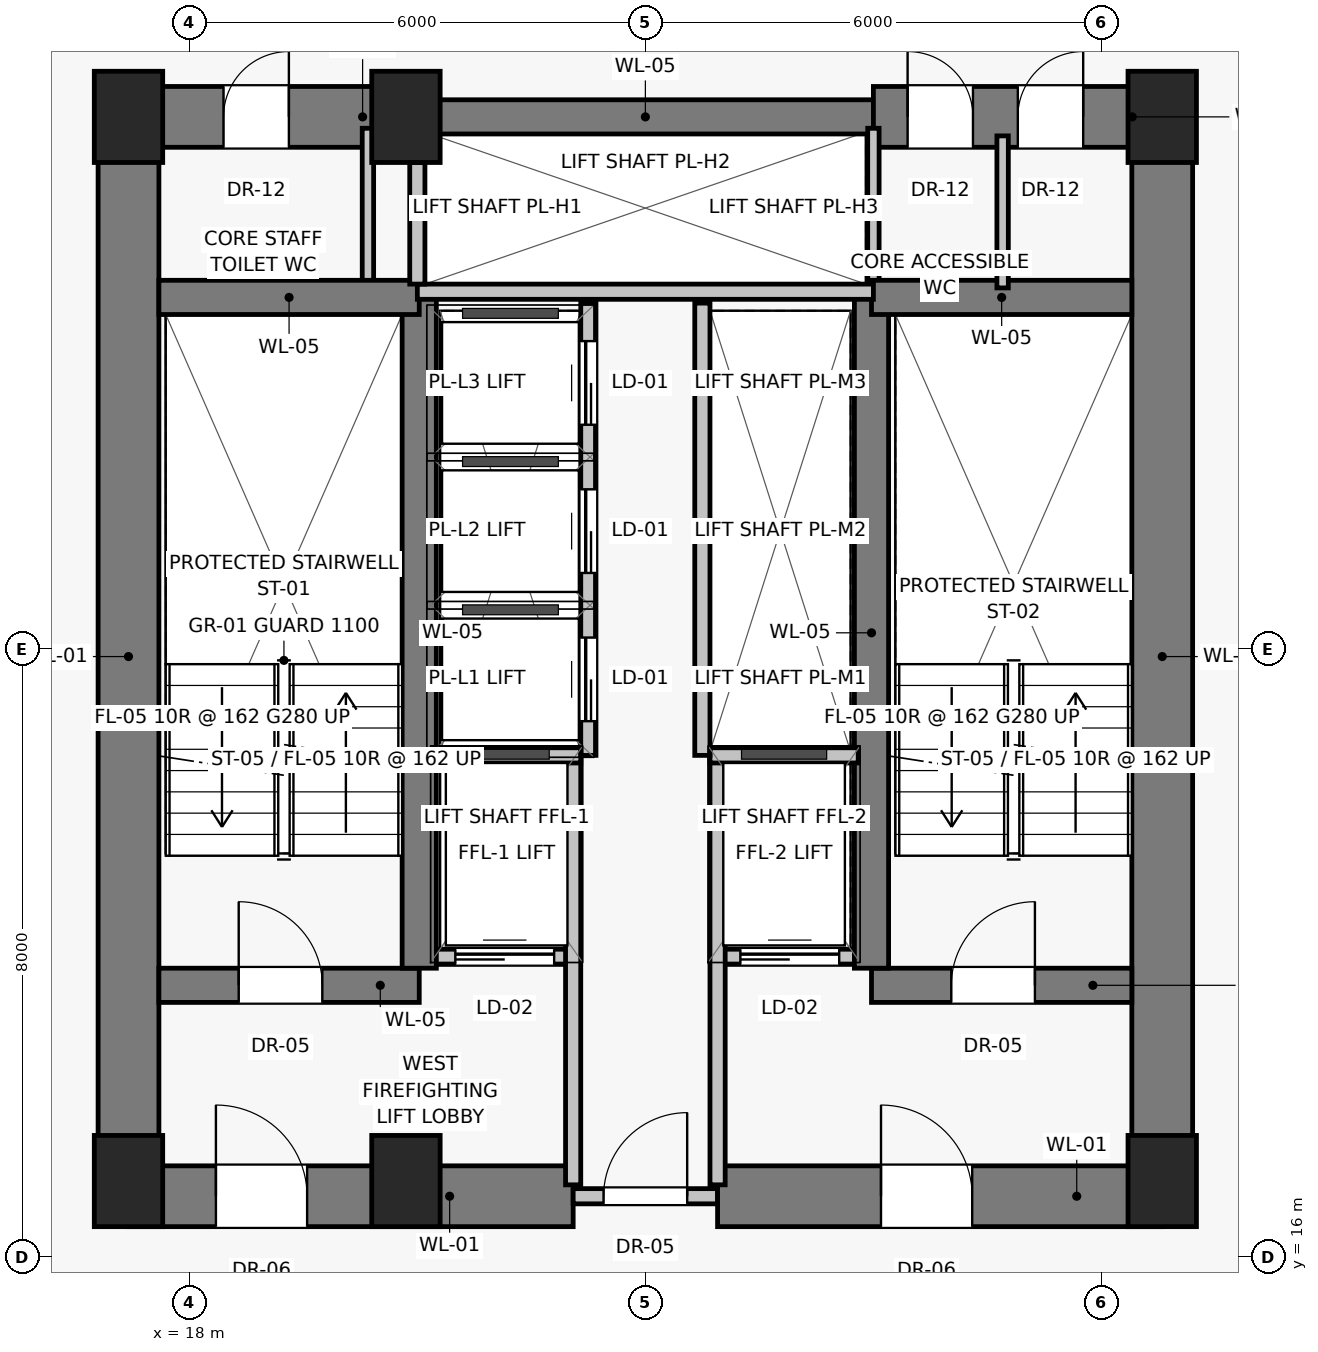
"""IFC4 building model, lengths in metres.
Left out: names, types, materials, properties, quantities, classifications, styles, units other than length and angle.
Written with IfcOpenShell. Run it as: python <this file> out.ifc"""

import sys

from ifc_helpers import new_model, si_unit, direction, frame, frame_2d, origin, origin_2d, place, context, subcontext, project, spatial, rectangle, extrude, source, transform, mapped, element, fill, save


model = new_model("IFC4")
c1 = context("Model", 3, precision=1e-05, world=origin(), true_north=direction((0.0, 1.0)))
c2 = subcontext(c1, "Body", "Model", "MODEL_VIEW")
j1 = project(units=[si_unit("LENGTHUNIT", "METRE"), si_unit("PLANEANGLEUNIT", "RADIAN")], contexts=[c1])
p1 = place(None, origin())
s1 = spatial("IfcSite", under=j1, at=p1, CompositionType="ELEMENT")
p2 = place(p1, origin())
s2 = spatial("IfcBuilding", under=s1, at=p2, CompositionType="ELEMENT")
p3 = place(p2, frame((0.0, 0.0, 37.05)))
s3 = spatial("IfcBuildingStorey", under=s2, at=p3, CompositionType="ELEMENT", Elevation=37.05)
for number, where, z_axis, x_axis in (
    (1, (17.2, 17.0, 0.0), (0.0, 0.0, 1.0), (1.0, 0.0, 0.0)),
    (2, (20.85, 17.0, 0.0), (0.0, 0.0, 1.0), (1.0, 0.0, 0.0)),
    (3, (30.8, 17.0, 0.0), (0.0, 0.0, 1.0), (1.0, 0.0, 0.0)),
    (4, (17.2, 31.0, 0.0), (0.0, 0.0, 1.0), (1.0, 0.0, 0.0)),
    (5, (20.85, 31.0, 0.0), (0.0, 0.0, 1.0), (1.0, 0.0, 0.0)),
    (6, (30.8, 31.0, 0.0), (0.0, 0.0, 1.0), (1.0, 0.0, 0.0)),
):
    element("IfcColumn", number, at=place(p3, frame(where, z_axis=z_axis, x_axis=x_axis)), inside=s3, PredefinedType="PILASTER", context=c2, shape_type="SweptSolid", body=[
        extrude(rectangle(XDim=0.9, YDim=1.2, at=origin_2d()), origin(), (0.0, 0.0, 1.0), 3.25),
    ])
for number, where, z_axis, x_axis in (
    (7, (17.2, 16.8, 0.0), (0.0, 0.0, 1.0), (0.0, 1.0, 0.0)),
    (8, (30.8, 16.8, 0.0), (0.0, 0.0, 1.0), (0.0, 1.0, 0.0)),
):
    element("IfcWall", number, at=place(p3, frame(where, z_axis=z_axis, x_axis=x_axis)), inside=s3, PredefinedType="SHEAR", context=c2, shape_type="SweptSolid", body=[
        extrude(rectangle(XDim=14.2, YDim=0.8, at=frame_2d((7.1, 0.0))), origin(), (0.0, 0.0, 1.0), 3.0),
    ])
p4 = place(p3, frame((17.2, 16.8, 0.0), z_axis=(0.0, 0.0, 1.0), x_axis=(1.0, 0.0, 0.0)))
e9 = element("IfcWall", 9, at=p4, inside=s3, PredefinedType="SHEAR", context=c2, shape_type="SweptSolid", body=[
    extrude(rectangle(XDim=5.85, YDim=0.8, at=frame_2d((2.925, 0.0))), origin(), (0.0, 0.0, 1.0), 3.0),
])
p5 = place(p4, frame((1.15, 0.0, 0.0)))
e10 = element("IfcOpeningElement", 10, at=p5, cuts=e9, PredefinedType="OPENING", context=c2, shape_type="SweptSolid", body=[
    extrude(rectangle(XDim=1.2, YDim=2.03, at=frame_2d((0.6, 1.015))), frame((0.0, 0.41, 0.0), z_axis=(0.0, -1.0, 0.0), x_axis=(1.0, 0.0, 0.0)), (0.0, 0.0, 1.0), 0.82),
])
p6 = place(p3, frame((23.05, 16.8, 0.0), z_axis=(0.0, 0.0, 1.0), x_axis=(1.0, 0.0, 0.0)))
e11 = element("IfcWall", 11, at=p6, inside=s3, PredefinedType="SOLIDWALL", context=c2, shape_type="SweptSolid", body=[
    extrude(rectangle(XDim=1.9, YDim=0.2, at=frame_2d((0.95, 0.0))), origin(), (0.0, 0.0, 1.0), 2.15),
])
p7 = place(p6, frame((0.4, 0.0, 0.0)))
e12 = element("IfcOpeningElement", 12, at=p7, cuts=e11, PredefinedType="OPENING", context=c2, shape_type="SweptSolid", body=[
    extrude(rectangle(XDim=1.1, YDim=2.03, at=frame_2d((0.55, 1.015))), frame((0.0, 0.11, 0.0), z_axis=(0.0, -1.0, 0.0), x_axis=(1.0, 0.0, 0.0)), (0.0, 0.0, 1.0), 0.22),
])
p8 = place(p3, frame((24.95, 16.8, 0.0), z_axis=(0.0, 0.0, 1.0), x_axis=(1.0, 0.0, 0.0)))
e13 = element("IfcWall", 13, at=p8, inside=s3, PredefinedType="SHEAR", context=c2, shape_type="SweptSolid", body=[
    extrude(rectangle(XDim=5.85, YDim=0.8, at=frame_2d((2.925, 0.0))), origin(), (0.0, 0.0, 1.0), 3.0),
])
p9 = place(p8, frame((2.15, 0.0, 0.0)))
e14 = element("IfcOpeningElement", 14, at=p9, cuts=e13, PredefinedType="OPENING", context=c2, shape_type="SweptSolid", body=[
    extrude(rectangle(XDim=1.2, YDim=2.03, at=frame_2d((0.6, 1.015))), frame((0.0, 0.41, 0.0), z_axis=(0.0, -1.0, 0.0), x_axis=(1.0, 0.0, 0.0)), (0.0, 0.0, 1.0), 0.82),
])
p10 = place(p3, frame((17.2, 31.0, 0.0), z_axis=(0.0, 0.0, 1.0), x_axis=(1.0, 0.0, 0.0)))
e15 = element("IfcWall", 15, at=p10, inside=s3, PredefinedType="SHEAR", context=c2, shape_type="SweptSolid", body=[
    extrude(rectangle(XDim=3.8, YDim=0.8, at=frame_2d((1.9, 0.0))), origin(), (0.0, 0.0, 1.0), 3.0),
])
p11 = place(p10, frame((1.25, 0.0, 0.0)))
e16 = element("IfcOpeningElement", 16, at=p11, cuts=e15, PredefinedType="OPENING", context=c2, shape_type="SweptSolid", body=[
    extrude(rectangle(XDim=0.86, YDim=2.01, at=frame_2d((0.43, 1.005))), frame((0.0, 0.41, 0.0), z_axis=(0.0, -1.0, 0.0), x_axis=(1.0, 0.0, 0.0)), (0.0, 0.0, 1.0), 0.82),
])
p12 = place(p3, frame((21.0, 31.0, 0.0), z_axis=(0.0, 0.0, 1.0), x_axis=(1.0, 0.0, 0.0)))
e17 = element("IfcWall", 17, at=p12, inside=s3, PredefinedType="SHEAR", context=c2, shape_type="SweptSolid", body=[
    extrude(rectangle(XDim=6.0, YDim=0.45, at=frame_2d((3.0, 0.0))), origin(), (0.0, 0.0, 1.0), 3.0),
])
p13 = place(p3, frame((27.0, 31.0, 0.0), z_axis=(0.0, 0.0, 1.0), x_axis=(1.0, 0.0, 0.0)))
e18 = element("IfcWall", 18, at=p13, inside=s3, PredefinedType="SHEAR", context=c2, shape_type="SweptSolid", body=[
    extrude(rectangle(XDim=3.8, YDim=0.8, at=frame_2d((1.9, 0.0))), origin(), (0.0, 0.0, 1.0), 3.0),
])
p14 = place(p13, frame((0.45, 0.0, 0.0)))
e19 = element("IfcOpeningElement", 19, at=p14, cuts=e18, PredefinedType="OPENING", context=c2, shape_type="SweptSolid", body=[
    extrude(rectangle(XDim=0.86, YDim=2.01, at=frame_2d((0.43, 1.005))), frame((0.0, 0.41, 0.0), z_axis=(0.0, -1.0, 0.0), x_axis=(1.0, 0.0, 0.0)), (0.0, 0.0, 1.0), 0.82),
])
p15 = place(p13, frame((1.9, 0.0, 0.0)))
e20 = element("IfcOpeningElement", 20, at=p15, cuts=e18, PredefinedType="OPENING", context=c2, shape_type="SweptSolid", body=[
    extrude(rectangle(XDim=0.86, YDim=2.01, at=frame_2d((0.43, 1.005))), frame((0.0, 0.41, 0.0), z_axis=(0.0, -1.0, 0.0), x_axis=(1.0, 0.0, 0.0)), (0.0, 0.0, 1.0), 0.82),
])
for number, where, z_axis, x_axis in (
    (21, (20.35, 28.65, 0.0), (0.0, 0.0, 1.0), (0.0, 1.0, 0.0)),
    (22, (27.0, 28.65, 0.0), (0.0, 0.0, 1.0), (0.0, 1.0, 0.0)),
):
    element("IfcWall", number, at=place(p3, frame(where, z_axis=z_axis, x_axis=x_axis)), inside=s3, PredefinedType="PARTITIONING", context=c2, shape_type="SweptSolid", body=[
        extrude(rectangle(XDim=2.2, YDim=0.15, at=frame_2d((1.1, 0.0))), origin(), (0.0, 0.0, 1.0), 3.0),
    ])
p16 = place(p3, frame((17.6, 19.575, 0.0), z_axis=(0.0, 0.0, 1.0), x_axis=(1.0, 0.0, 0.0)))
e23 = element("IfcWall", 23, at=p16, inside=s3, PredefinedType="SHEAR", context=c2, shape_type="SweptSolid", body=[
    extrude(rectangle(XDim=3.425, YDim=0.45, at=frame_2d((1.712, 0.0))), origin(), (0.0, 0.0, 1.0), 3.0),
])
p17 = place(p16, frame((1.05, 0.0, 0.0)))
e24 = element("IfcOpeningElement", 24, at=p17, cuts=e23, PredefinedType="OPENING", context=c2, shape_type="SweptSolid", body=[
    extrude(rectangle(XDim=1.1, YDim=2.03, at=frame_2d((0.55, 1.015))), frame((0.0, 0.235, 0.0), z_axis=(0.0, -1.0, 0.0), x_axis=(1.0, 0.0, 0.0)), (0.0, 0.0, 1.0), 0.47),
])
p18 = place(p3, frame((21.2, 19.95, 0.0), z_axis=(0.0, 0.0, 1.0), x_axis=(1.0, 0.0, 0.0)))
e25 = element("IfcWall", 25, at=p18, inside=s3, PredefinedType="SOLIDWALL", context=c2, shape_type="SweptSolid", body=[
    extrude(rectangle(XDim=1.85, YDim=0.2, at=frame_2d((0.925, 0.0))), origin(), (0.0, 0.0, 1.0), 3.0),
])
p19 = place(p18, frame((0.3, 0.0, 0.0)))
e26 = element("IfcOpeningElement", 26, at=p19, cuts=e25, PredefinedType="OPENING", context=c2, shape_type="SweptSolid", body=[
    extrude(rectangle(XDim=1.3, YDim=2.25, at=frame_2d((0.65, 1.125))), frame((0.0, 0.11, 0.0), z_axis=(0.0, -1.0, 0.0), x_axis=(1.0, 0.0, 0.0)), (0.0, 0.0, 1.0), 0.22),
])
p20 = place(p3, frame((24.95, 19.95, 0.0), z_axis=(0.0, 0.0, 1.0), x_axis=(1.0, 0.0, 0.0)))
e27 = element("IfcWall", 27, at=p20, inside=s3, PredefinedType="SOLIDWALL", context=c2, shape_type="SweptSolid", body=[
    extrude(rectangle(XDim=1.85, YDim=0.2, at=frame_2d((0.925, 0.0))), origin(), (0.0, 0.0, 1.0), 3.0),
])
p21 = place(p20, frame((0.3, 0.0, 0.0)))
e28 = element("IfcOpeningElement", 28, at=p21, cuts=e27, PredefinedType="OPENING", context=c2, shape_type="SweptSolid", body=[
    extrude(rectangle(XDim=1.3, YDim=2.25, at=frame_2d((0.65, 1.125))), frame((0.0, 0.11, 0.0), z_axis=(0.0, -1.0, 0.0), x_axis=(1.0, 0.0, 0.0)), (0.0, 0.0, 1.0), 0.22),
])
p22 = place(p3, frame((26.975, 19.575, 0.0), z_axis=(0.0, 0.0, 1.0), x_axis=(1.0, 0.0, 0.0)))
e29 = element("IfcWall", 29, at=p22, inside=s3, PredefinedType="SHEAR", context=c2, shape_type="SweptSolid", body=[
    extrude(rectangle(XDim=3.425, YDim=0.45, at=frame_2d((1.712, 0.0))), origin(), (0.0, 0.0, 1.0), 3.0),
])
p23 = place(p22, frame((1.05, 0.0, 0.0)))
e30 = element("IfcOpeningElement", 30, at=p23, cuts=e29, PredefinedType="OPENING", context=c2, shape_type="SweptSolid", body=[
    extrude(rectangle(XDim=1.1, YDim=2.03, at=frame_2d((0.55, 1.015))), frame((0.0, 0.235, 0.0), z_axis=(0.0, -1.0, 0.0), x_axis=(1.0, 0.0, 0.0)), (0.0, 0.0, 1.0), 0.47),
])
for number, where, z_axis, x_axis in (
    (31, (21.025, 19.8, 0.0), (0.0, 0.0, 1.0), (0.0, 1.0, 0.0)),
    (32, (26.975, 19.8, 0.0), (0.0, 0.0, 1.0), (0.0, 1.0, 0.0)),
):
    element("IfcWall", number, at=place(p3, frame(where, z_axis=z_axis, x_axis=x_axis)), inside=s3, PredefinedType="SHEAR", context=c2, shape_type="SweptSolid", body=[
        extrude(rectangle(XDim=8.825, YDim=0.45, at=frame_2d((4.413, 0.0))), origin(), (0.0, 0.0, 1.0), 3.0),
    ])
for number, where, z_axis, x_axis in (
    (33, (17.6, 28.625, 0.0), (0.0, 0.0, 1.0), (1.0, 0.0, 0.0)),
    (34, (26.975, 28.625, 0.0), (0.0, 0.0, 1.0), (1.0, 0.0, 0.0)),
):
    element("IfcWall", number, at=place(p3, frame(where, z_axis=z_axis, x_axis=x_axis)), inside=s3, PredefinedType="SHEAR", context=c2, shape_type="SweptSolid", body=[
        extrude(rectangle(XDim=3.425, YDim=0.45, at=frame_2d((1.712, 0.0))), origin(), (0.0, 0.0, 1.0), 3.0),
    ])
for number, where, z_axis, x_axis in (
    (35, (23.05, 16.95, 0.0), (0.0, 0.0, 1.0), (0.0, 1.0, 0.0)),
    (36, (24.95, 16.95, 0.0), (0.0, 0.0, 1.0), (0.0, 1.0, 0.0)),
):
    element("IfcWall", number, at=place(p3, frame(where, z_axis=z_axis, x_axis=x_axis)), inside=s3, PredefinedType="SOLIDWALL", context=c2, shape_type="SweptSolid", body=[
        extrude(rectangle(XDim=5.6, YDim=0.2, at=frame_2d((2.8, 0.0))), origin(), (0.0, 0.0, 1.0), 3.0),
    ])
for number, where, z_axis, x_axis in (
    (37, (21.2, 22.6, 0.0), (0.0, 0.0, 1.0), (1.0, 0.0, 0.0)),
    (38, (24.85, 22.6, 0.0), (0.0, 0.0, 1.0), (1.0, 0.0, 0.0)),
):
    element("IfcWall", number, at=place(p3, frame(where, z_axis=z_axis, x_axis=x_axis)), inside=s3, PredefinedType="SOLIDWALL", context=c2, shape_type="SweptSolid", body=[
        extrude(rectangle(XDim=1.95, YDim=0.2, at=frame_2d((0.975, 0.0))), origin(), (0.0, 0.0, 1.0), 3.0),
    ])
p24 = place(p3, frame((21.0, 28.7, 0.0), z_axis=(0.0, 0.0, 1.0), x_axis=(1.0, 0.0, 0.0)))
e39 = element("IfcWall", 39, at=p24, inside=s3, PredefinedType="SOLIDWALL", context=c2, shape_type="SweptSolid", body=[
    extrude(rectangle(XDim=6.0, YDim=0.2, at=frame_2d((3.0, 0.0))), origin(), (0.0, 0.0, 1.0), 3.0),
])
p25 = place(p3, frame((21.0, 28.8, 0.0), z_axis=(0.0, 0.0, 1.0), x_axis=(0.0, 1.0, 0.0)))
e40 = element("IfcWall", 40, at=p25, inside=s3, PredefinedType="SOLIDWALL", context=c2, shape_type="SweptSolid", body=[
    extrude(rectangle(XDim=1.6, YDim=0.2, at=frame_2d((0.8, 0.0))), origin(), (0.0, 0.0, 1.0), 3.0),
])
p26 = place(p3, frame((23.25, 22.6, 0.0), z_axis=(0.0, 0.0, 1.0), x_axis=(0.0, 1.0, 0.0)))
e41 = element("IfcWall", 41, at=p26, inside=s3, PredefinedType="SOLIDWALL", context=c2, shape_type="SweptSolid", body=[
    extrude(rectangle(XDim=5.95, YDim=0.2, at=frame_2d((2.975, 0.0))), origin(), (0.0, 0.0, 1.0), 3.0),
])
p27 = place(p26, frame((0.45, 0.0, 0.0)))
e42 = element("IfcOpeningElement", 42, at=p27, cuts=e41, PredefinedType="OPENING", context=c2, shape_type="SweptSolid", body=[
    extrude(rectangle(XDim=1.1, YDim=2.08, at=frame_2d((0.55, 1.04))), frame((0.0, 0.11, 0.0), z_axis=(0.0, -1.0, 0.0), x_axis=(1.0, 0.0, 0.0)), (0.0, 0.0, 1.0), 0.22),
])
p28 = place(p26, frame((2.4, 0.0, 0.0)))
e43 = element("IfcOpeningElement", 43, at=p28, cuts=e41, PredefinedType="OPENING", context=c2, shape_type="SweptSolid", body=[
    extrude(rectangle(XDim=1.1, YDim=2.08, at=frame_2d((0.55, 1.04))), frame((0.0, 0.11, 0.0), z_axis=(0.0, -1.0, 0.0), x_axis=(1.0, 0.0, 0.0)), (0.0, 0.0, 1.0), 0.22),
])
p29 = place(p26, frame((4.35, 0.0, 0.0)))
e44 = element("IfcOpeningElement", 44, at=p29, cuts=e41, PredefinedType="OPENING", context=c2, shape_type="SweptSolid", body=[
    extrude(rectangle(XDim=1.1, YDim=2.08, at=frame_2d((0.55, 1.04))), frame((0.0, 0.11, 0.0), z_axis=(0.0, -1.0, 0.0), x_axis=(1.0, 0.0, 0.0)), (0.0, 0.0, 1.0), 0.22),
])
p30 = place(p3, frame((24.75, 22.6, 0.0), z_axis=(0.0, 0.0, 1.0), x_axis=(0.0, 1.0, 0.0)))
e45 = element("IfcWall", 45, at=p30, inside=s3, PredefinedType="SOLIDWALL", context=c2, shape_type="SweptSolid", body=[
    extrude(rectangle(XDim=5.95, YDim=0.2, at=frame_2d((2.975, 0.0))), origin(), (0.0, 0.0, 1.0), 3.0),
])
p31 = place(p3, frame((28.7, 28.75, 0.0), z_axis=(0.0, 0.0, 1.0), x_axis=(0.0, 1.0, 0.0)))
e46 = element("IfcWall", 46, at=p31, inside=s3, PredefinedType="PARTITIONING", context=c2, shape_type="SweptSolid", body=[
    extrude(rectangle(XDim=2.0, YDim=0.15, at=frame_2d((1.0, 0.0))), origin(), (0.0, 0.0, 1.0), 3.0),
])
m1 = source(origin(), c2, "Body", "SweptSolid", [
    extrude(rectangle(XDim=1.2, YDim=2.03, at=frame_2d((0.6, 1.015))), frame((0.0, 0.025, 0.0), z_axis=(0.0, -1.0, 0.0), x_axis=(1.0, 0.0, 0.0)), (0.0, 0.0, 1.0), 0.05),
])
p32 = place(p5, origin())
e47 = element("IfcDoor", 47, at=p32, inside=s3, OperationType="SINGLE_SWING_LEFT", PredefinedType="DOOR", context=c2, shape_type="MappedRepresentation", body=[
    mapped(m1, transform((0.0, 0.0, 0.0), scale=1.0)),
])
fill(e10, e47)
m2 = source(origin(), c2, "Body", "SweptSolid", [
    extrude(rectangle(XDim=1.1, YDim=2.03, at=frame_2d((0.55, 1.015))), frame((0.0, 0.025, 0.0), z_axis=(0.0, -1.0, 0.0), x_axis=(1.0, 0.0, 0.0)), (0.0, 0.0, 1.0), 0.05),
])
p33 = place(p7, origin())
e48 = element("IfcDoor", 48, at=p33, inside=s3, OperationType="SINGLE_SWING_RIGHT", PredefinedType="DOOR", context=c2, shape_type="MappedRepresentation", body=[
    mapped(m2, transform((0.0, 0.0, 0.0), scale=1.0)),
])
fill(e12, e48)
p34 = place(p9, origin())
e49 = element("IfcDoor", 49, at=p34, inside=s3, OperationType="SINGLE_SWING_LEFT", PredefinedType="DOOR", context=c2, shape_type="MappedRepresentation", body=[
    mapped(m1, transform((0.0, 0.0, 0.0), scale=1.0)),
])
fill(e14, e49)
m3 = source(origin(), c2, "Body", "SweptSolid", [
    extrude(rectangle(XDim=0.86, YDim=2.01, at=frame_2d((0.43, 1.005))), frame((0.0, 0.025, 0.0), z_axis=(0.0, -1.0, 0.0), x_axis=(1.0, 0.0, 0.0)), (0.0, 0.0, 1.0), 0.05),
])
p35 = place(p11, origin())
e50 = element("IfcDoor", 50, at=p35, inside=s3, OperationType="SINGLE_SWING_RIGHT", PredefinedType="DOOR", context=c2, shape_type="MappedRepresentation", body=[
    mapped(m3, transform((0.0, 0.0, 0.0), scale=1.0)),
])
fill(e16, e50)
p36 = place(p14, origin())
e51 = element("IfcDoor", 51, at=p36, inside=s3, OperationType="SINGLE_SWING_LEFT", PredefinedType="DOOR", context=c2, shape_type="MappedRepresentation", body=[
    mapped(m3, transform((0.0, 0.0, 0.0), scale=1.0)),
])
fill(e19, e51)
p37 = place(p15, origin())
e52 = element("IfcDoor", 52, at=p37, inside=s3, OperationType="SINGLE_SWING_RIGHT", PredefinedType="DOOR", context=c2, shape_type="MappedRepresentation", body=[
    mapped(m3, transform((0.0, 0.0, 0.0), scale=1.0)),
])
fill(e20, e52)
p38 = place(p17, origin())
e53 = element("IfcDoor", 53, at=p38, inside=s3, OperationType="SINGLE_SWING_LEFT", PredefinedType="DOOR", context=c2, shape_type="MappedRepresentation", body=[
    mapped(m2, transform((0.0, 0.0, 0.0), scale=1.0)),
])
fill(e24, e53)
m4 = source(origin(), c2, "Body", "SweptSolid", [
    extrude(rectangle(XDim=1.3, YDim=2.25, at=frame_2d((0.65, 1.125))), frame((0.0, 0.025, 0.0), z_axis=(0.0, -1.0, 0.0), x_axis=(1.0, 0.0, 0.0)), (0.0, 0.0, 1.0), 0.05),
])
p39 = place(p19, origin())
e54 = element("IfcDoor", 54, at=p39, inside=s3, OperationType="SLIDING_TO_LEFT", PredefinedType="DOOR", context=c2, shape_type="MappedRepresentation", body=[
    mapped(m4, transform((0.0, 0.0, 0.0), scale=1.0)),
])
fill(e26, e54)
p40 = place(p21, origin())
e55 = element("IfcDoor", 55, at=p40, inside=s3, OperationType="SLIDING_TO_LEFT", PredefinedType="DOOR", context=c2, shape_type="MappedRepresentation", body=[
    mapped(m4, transform((0.0, 0.0, 0.0), scale=1.0)),
])
fill(e28, e55)
p41 = place(p23, origin())
e56 = element("IfcDoor", 56, at=p41, inside=s3, OperationType="SINGLE_SWING_RIGHT", PredefinedType="DOOR", context=c2, shape_type="MappedRepresentation", body=[
    mapped(m2, transform((0.0, 0.0, 0.0), scale=1.0)),
])
fill(e30, e56)
m5 = source(origin(), c2, "Body", "SweptSolid", [
    extrude(rectangle(XDim=1.1, YDim=2.08, at=frame_2d((0.55, 1.04))), frame((0.0, 0.025, 0.0), z_axis=(0.0, -1.0, 0.0), x_axis=(1.0, 0.0, 0.0)), (0.0, 0.0, 1.0), 0.05),
])
p42 = place(p27, origin())
e57 = element("IfcDoor", 57, at=p42, inside=s3, OperationType="SLIDING_TO_LEFT", PredefinedType="DOOR", context=c2, shape_type="MappedRepresentation", body=[
    mapped(m5, transform((0.0, 0.0, 0.0), scale=1.0)),
])
fill(e42, e57)
p43 = place(p28, origin())
e58 = element("IfcDoor", 58, at=p43, inside=s3, OperationType="SLIDING_TO_LEFT", PredefinedType="DOOR", context=c2, shape_type="MappedRepresentation", body=[
    mapped(m5, transform((0.0, 0.0, 0.0), scale=1.0)),
])
fill(e43, e58)
p44 = place(p29, origin())
e59 = element("IfcDoor", 59, at=p44, inside=s3, OperationType="SLIDING_TO_LEFT", PredefinedType="DOOR", context=c2, shape_type="MappedRepresentation", body=[
    mapped(m5, transform((0.0, 0.0, 0.0), scale=1.0)),
])
fill(e44, e59)
save(model, sys.argv[1])
